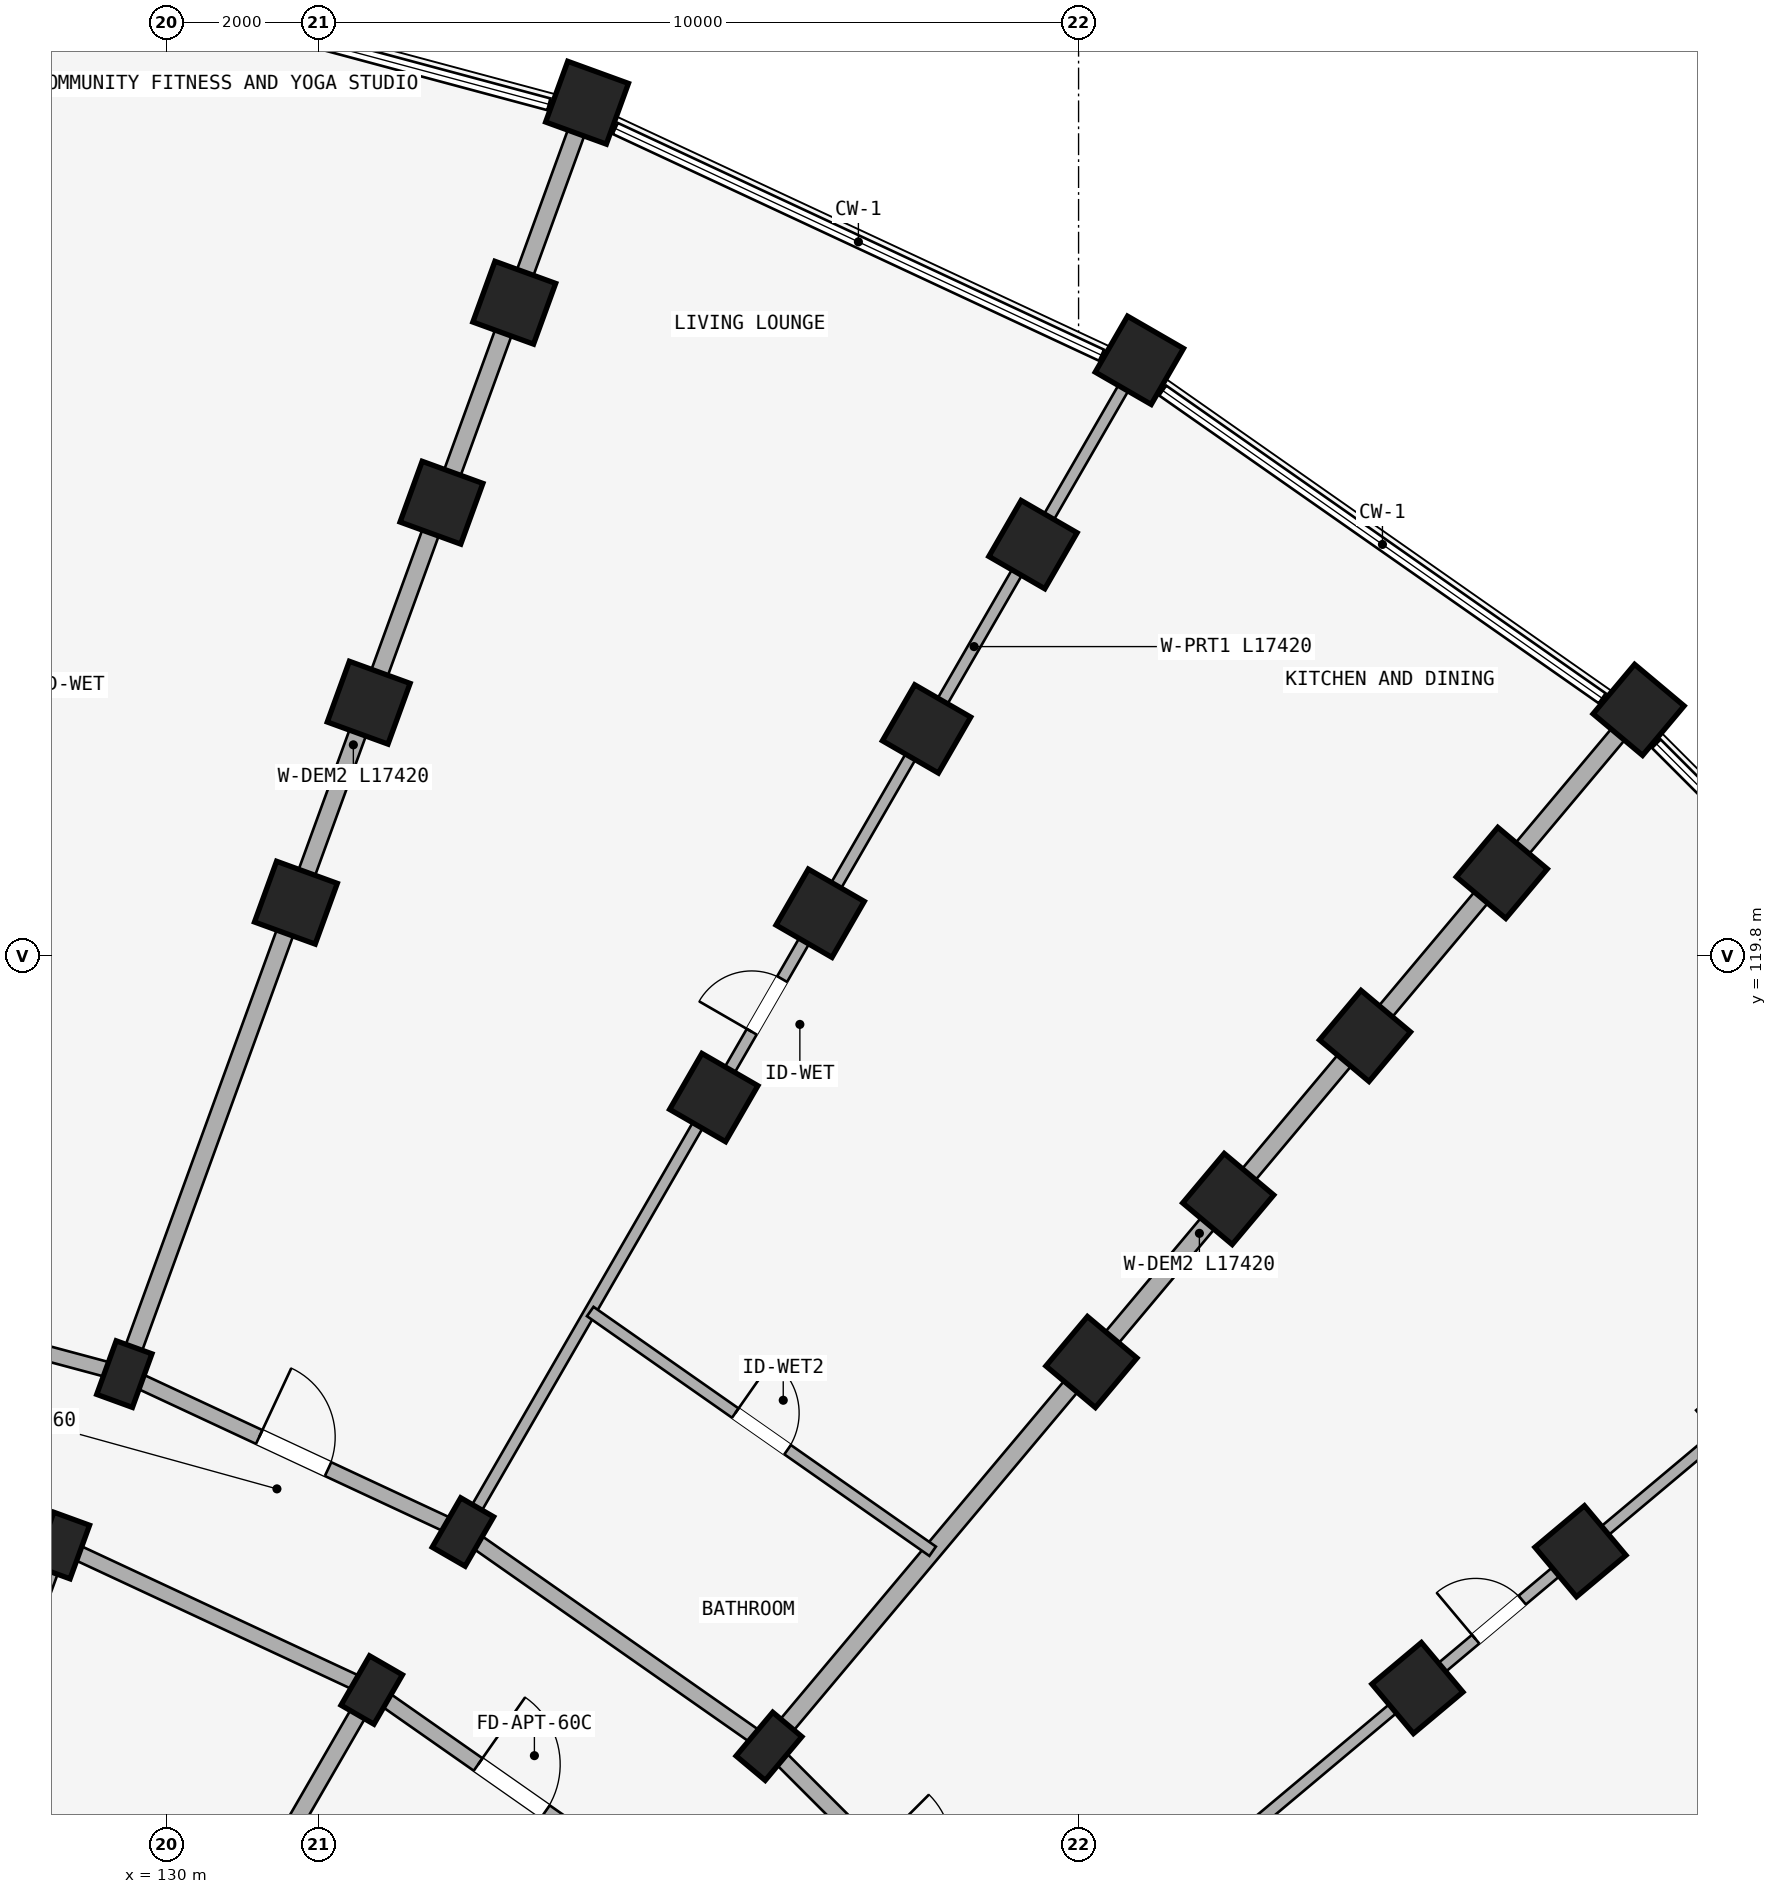
"""IFC4 building model, lengths in metres.
Left out: names, types, materials, properties, quantities, classifications, styles, units other than length and angle.
Written with IfcOpenShell. Run it as: python <this file> out.ifc"""

import sys

from ifc_helpers import new_model, si_unit, direction, frame, frame_2d, origin, origin_2d, place, context, subcontext, project, spatial, rectangle, extrude, element, fill, save


model = new_model("IFC4")
c1 = context("Model", 3, precision=1e-05, world=origin(), true_north=direction((0.0, 1.0)))
c2 = subcontext(c1, "Body", "Model", "MODEL_VIEW")
j1 = project(units=[si_unit("LENGTHUNIT", "METRE"), si_unit("PLANEANGLEUNIT", "RADIAN")], contexts=[c1])
p1 = place(None, origin())
s1 = spatial("IfcSite", under=j1, at=p1, CompositionType="ELEMENT")
p2 = place(p1, origin())
s2 = spatial("IfcBuilding", under=s1, at=p2, CompositionType="ELEMENT")
p3 = place(p2, frame((0.0, 0.0, 4.5)))
s3 = spatial("IfcBuildingStorey", under=s2, at=p3, CompositionType="ELEMENT", Elevation=4.5)
for number, where, z_axis, x_axis in (
    (1, (128.624, 112.044, 0.0), (0.0, 0.0, 1.0), (-0.94, 0.342, 0.0)),
    (2, (129.445, 114.299, 0.0), (0.0, 0.0, 1.0), (-0.94, 0.342, 0.0)),
):
    element("IfcColumn", number, at=place(p3, frame(where, z_axis=z_axis, x_axis=x_axis)), inside=s3, PredefinedType="COLUMN", context=c2, shape_type="SweptSolid", body=[
        extrude(rectangle(XDim=0.5, YDim=0.75, at=origin_2d()), origin(), (0.0, 0.0, 1.0), 3.98),
    ])
for number, where, z_axis, x_axis in (
    (3, (131.702, 120.501, 0.0), (0.0, 0.0, 1.0), (-0.94, 0.342, 0.0)),
    (4, (132.66, 123.132, 0.0), (0.0, 0.0, 1.0), (-0.94, 0.342, 0.0)),
    (5, (133.618, 125.764, 0.0), (0.0, 0.0, 1.0), (-0.94, 0.342, 0.0)),
    (6, (134.575, 128.395, 0.0), (0.0, 0.0, 1.0), (-0.94, 0.342, 0.0)),
    (7, (135.533, 131.026, 0.0), (0.0, 0.0, 1.0), (-0.94, 0.342, 0.0)),
):
    element("IfcColumn", number, at=place(p3, frame(where, z_axis=z_axis, x_axis=x_axis)), inside=s3, PredefinedType="COLUMN", context=c2, shape_type="SweptSolid", body=[
        extrude(rectangle(XDim=0.85, YDim=0.85, at=origin_2d()), origin(), (0.0, 0.0, 1.0), 3.98),
    ])
for number, where, z_axis, x_axis in (
    (8, (132.7, 110.144, 0.0), (0.0, 0.0, 1.0), (-0.866, 0.5, 0.0)),
    (9, (133.9, 112.222, 0.0), (0.0, 0.0, 1.0), (-0.866, 0.5, 0.0)),
):
    element("IfcColumn", number, at=place(p3, frame(where, z_axis=z_axis, x_axis=x_axis)), inside=s3, PredefinedType="COLUMN", context=c2, shape_type="SweptSolid", body=[
        extrude(rectangle(XDim=0.5, YDim=0.75, at=origin_2d()), origin(), (0.0, 0.0, 1.0), 3.98),
    ])
for number, where, z_axis, x_axis in (
    (10, (137.2, 117.938, 0.0), (0.0, 0.0, 1.0), (-0.866, 0.5, 0.0)),
    (11, (138.6, 120.363, 0.0), (0.0, 0.0, 1.0), (-0.866, 0.5, 0.0)),
    (12, (140.0, 122.787, 0.0), (0.0, 0.0, 1.0), (-0.866, 0.5, 0.0)),
    (13, (141.4, 125.212, 0.0), (0.0, 0.0, 1.0), (-0.866, 0.5, 0.0)),
    (14, (142.8, 127.637, 0.0), (0.0, 0.0, 1.0), (-0.866, 0.5, 0.0)),
):
    element("IfcColumn", number, at=place(p3, frame(where, z_axis=z_axis, x_axis=x_axis)), inside=s3, PredefinedType="COLUMN", context=c2, shape_type="SweptSolid", body=[
        extrude(rectangle(XDim=0.85, YDim=0.85, at=origin_2d()), origin(), (0.0, 0.0, 1.0), 3.98),
    ])
p4 = place(p3, frame((137.927, 109.402, 0.0), z_axis=(0.0, 0.0, 1.0), x_axis=(-0.766044443119, 0.642787609687, 0.0)))
e15 = element("IfcColumn", 15, at=p4, inside=s3, PredefinedType="COLUMN", context=c2, shape_type="SweptSolid", body=[
    extrude(rectangle(XDim=0.5, YDim=0.75, at=origin_2d()), origin(), (0.0, 0.0, 1.0), 3.98),
])
for number, where, z_axis, x_axis in (
    (16, (142.169, 114.458, 0.0), (0.0, 0.0, 1.0), (-0.766, 0.643, 0.0)),
    (17, (143.969, 116.603, 0.0), (0.0, 0.0, 1.0), (-0.766, 0.643, 0.0)),
    (18, (145.769, 118.748, 0.0), (0.0, 0.0, 1.0), (-0.766, 0.643, 0.0)),
    (19, (147.568, 120.893, 0.0), (0.0, 0.0, 1.0), (-0.766, 0.643, 0.0)),
    (20, (149.368, 123.038, 0.0), (0.0, 0.0, 1.0), (-0.766, 0.643, 0.0)),
    (21, (146.458, 110.169, 0.0), (0.0, 0.0, 1.0), (-0.643, 0.766, 0.0)),
    (22, (148.603, 111.969, 0.0), (0.0, 0.0, 1.0), (-0.643, 0.766, 0.0)),
):
    element("IfcColumn", number, at=place(p3, frame(where, z_axis=z_axis, x_axis=x_axis)), inside=s3, PredefinedType="COLUMN", context=c2, shape_type="SweptSolid", body=[
        extrude(rectangle(XDim=0.85, YDim=0.85, at=origin_2d()), origin(), (0.0, 0.0, 1.0), 3.98),
    ])
p5 = place(p3, frame((124.28, 113.208, 0.0), z_axis=(0.0, 0.0, 1.0), x_axis=(0.965934240054, -0.258787642463, 0.0)))
e23 = element("IfcWall", 23, at=p5, inside=s3, PredefinedType="STANDARD", context=c2, shape_type="SweptSolid", body=[
    extrude(rectangle(XDim=4.497, YDim=0.2, at=frame_2d((2.249, 0.0))), origin(), (0.0, 0.0, 1.0), 3.322),
])
p6 = place(p3, frame((124.697, 115.572, 0.0), z_axis=(0.0, 0.0, 1.0), x_axis=(0.965930095386, -0.258803112091, 0.0)))
e24 = element("IfcWall", 24, at=p6, inside=s3, PredefinedType="STANDARD", context=c2, shape_type="SweptSolid", body=[
    extrude(rectangle(XDim=4.916, YDim=0.2, at=frame_2d((2.458, 0.0))), origin(), (0.0, 0.0, 1.0), 3.322),
])
p7 = place(p3, frame((128.624, 112.044, 0.0), z_axis=(0.0, 0.0, 1.0), x_axis=(0.906307919131, -0.422617978463, 0.0)))
e25 = element("IfcWall", 25, at=p7, inside=s3, PredefinedType="STANDARD", context=c2, shape_type="SweptSolid", body=[
    extrude(rectangle(XDim=4.497, YDim=0.2, at=frame_2d((2.249, 0.0))), origin(), (0.0, 0.0, 1.0), 3.322),
])
p8 = place(p3, frame((129.445, 114.299, 0.0), z_axis=(0.0, 0.0, 1.0), x_axis=(0.906302381024, -0.422629854778, 0.0)))
e26 = element("IfcWall", 26, at=p8, inside=s3, PredefinedType="STANDARD", context=c2, shape_type="SweptSolid", body=[
    extrude(rectangle(XDim=4.915, YDim=0.2, at=frame_2d((2.458, 0.0))), origin(), (0.0, 0.0, 1.0), 3.322),
])
p9 = place(p8, frame((1.958, 0.0, 0.0)))
e27 = element("IfcOpeningElement", 27, at=p9, cuts=e26, PredefinedType="OPENING", context=c2, shape_type="SweptSolid", body=[
    extrude(rectangle(XDim=1.0, YDim=2.15, at=frame_2d((0.5, 1.075))), frame((0.0, 0.11, 0.0), z_axis=(0.0, -1.0, 0.0), x_axis=(1.0, 0.0, 0.0)), (0.0, 0.0, 1.0), 0.22),
])
p10 = place(p3, frame((132.7, 110.144, 0.0), z_axis=(0.0, 0.0, 1.0), x_axis=(0.819155404658, -0.573571637217, 0.0)))
e28 = element("IfcWall", 28, at=p10, inside=s3, PredefinedType="STANDARD", context=c2, shape_type="SweptSolid", body=[
    extrude(rectangle(XDim=4.497, YDim=0.2, at=frame_2d((2.249, 0.0))), origin(), (0.0, 0.0, 1.0), 3.322),
])
p11 = place(p10, frame((1.709, 0.0, 0.0)))
e29 = element("IfcOpeningElement", 29, at=p11, cuts=e28, PredefinedType="OPENING", context=c2, shape_type="SweptSolid", body=[
    extrude(rectangle(XDim=1.08, YDim=2.15, at=frame_2d((0.54, 1.075))), frame((0.0, 0.11, 0.0), z_axis=(0.0, -1.0, 0.0), x_axis=(1.0, 0.0, 0.0)), (0.0, 0.0, 1.0), 0.22),
])
p12 = place(p3, frame((133.9, 112.222, 0.0), z_axis=(0.0, 0.0, 1.0), x_axis=(0.819140911474, -0.573592335331, 0.0)))
e30 = element("IfcWall", 30, at=p12, inside=s3, PredefinedType="STANDARD", context=c2, shape_type="SweptSolid", body=[
    extrude(rectangle(XDim=4.916, YDim=0.2, at=frame_2d((2.458, 0.0))), origin(), (0.0, 0.0, 1.0), 3.322),
])
p13 = place(p3, frame((137.927, 109.402, 0.0), z_axis=(0.0, 0.0, 1.0), x_axis=(0.707106781187, -0.707106781187, 0.0)))
e31 = element("IfcWall", 31, at=p13, inside=s3, PredefinedType="STANDARD", context=c2, shape_type="SweptSolid", body=[
    extrude(rectangle(XDim=4.916, YDim=0.2, at=frame_2d((2.458, 0.0))), origin(), (0.0, 0.0, 1.0), 3.322),
])
p14 = place(p13, frame((1.938, 0.0, 0.0)))
e32 = element("IfcOpeningElement", 32, at=p14, cuts=e31, PredefinedType="OPENING", context=c2, shape_type="SweptSolid", body=[
    extrude(rectangle(XDim=1.04, YDim=2.15, at=frame_2d((0.52, 1.075))), frame((0.0, 0.11, 0.0), z_axis=(0.0, -1.0, 0.0), x_axis=(1.0, 0.0, 0.0)), (0.0, 0.0, 1.0), 0.22),
])
p15 = place(p3, frame((126.298, 105.654, 0.0), z_axis=(0.0, 0.0, 1.0), x_axis=(0.342010221662, 0.939696231917, 0.0)))
e33 = element("IfcWall", 33, at=p15, inside=s3, PredefinedType="PARTITIONING", context=c2, shape_type="SweptSolid", body=[
    extrude(rectangle(XDim=6.75, YDim=0.15, at=frame_2d((3.375, 0.0))), origin(), (0.0, 0.0, 1.0), 3.322),
])
p16 = place(p15, frame((3.242, 0.0, 0.0)))
e34 = element("IfcOpeningElement", 34, at=p16, cuts=e33, PredefinedType="OPENING", context=c2, shape_type="SweptSolid", body=[
    extrude(rectangle(XDim=0.94, YDim=2.1, at=frame_2d((0.47, 1.05))), frame((0.0, 0.085, 0.0), z_axis=(0.0, -1.0, 0.0), x_axis=(1.0, 0.0, 0.0)), (0.0, 0.0, 1.0), 0.17),
])
p17 = place(p3, frame((129.479, 114.393, 0.0), z_axis=(0.0, 0.0, 1.0), x_axis=(0.342022120477, 0.939691901159, 0.0)))
e35 = element("IfcWall", 35, at=p17, inside=s3, PredefinedType="STANDARD", context=c2, shape_type="SweptSolid", body=[
    extrude(rectangle(XDim=17.42, YDim=0.23, at=frame_2d((8.71, 0.0))), origin(), (0.0, 0.0, 1.0), 3.322),
])
p18 = place(p3, frame((129.3, 104.254, 0.0), z_axis=(0.0, 0.0, 1.0), x_axis=(0.499997969693, 0.866026575979, 0.0)))
e36 = element("IfcWall", 36, at=p18, inside=s3, PredefinedType="STANDARD", context=c2, shape_type="SweptSolid", body=[
    extrude(rectangle(XDim=6.75, YDim=0.22, at=frame_2d((3.375, 0.0))), origin(), (0.0, 0.0, 1.0), 3.322),
])
p19 = place(p3, frame((133.95, 112.309, 0.0), z_axis=(0.0, 0.0, 1.0), x_axis=(0.499997843263, 0.866026648973, 0.0)))
e37 = element("IfcWall", 37, at=p19, inside=s3, PredefinedType="PARTITIONING", context=c2, shape_type="SweptSolid", body=[
    extrude(rectangle(XDim=17.42, YDim=0.15, at=frame_2d((8.71, 0.0))), origin(), (0.0, 0.0, 1.0), 3.322),
])
p20 = place(p19, frame((7.5, 0.0, 0.0)))
e38 = element("IfcOpeningElement", 38, at=p20, cuts=e37, PredefinedType="OPENING", context=c2, shape_type="SweptSolid", body=[
    extrude(rectangle(XDim=0.8, YDim=2.1, at=frame_2d((0.4, 1.05))), frame((0.0, 0.085, 0.0), z_axis=(0.0, -1.0, 0.0), x_axis=(1.0, 0.0, 0.0)), (0.0, 0.0, 1.0), 0.17),
])
p21 = place(p3, frame((137.991, 109.479, 0.0), z_axis=(0.0, 0.0, 1.0), x_axis=(0.642784757967, 0.766046835987, 0.0)))
e39 = element("IfcWall", 39, at=p21, inside=s3, PredefinedType="STANDARD", context=c2, shape_type="SweptSolid", body=[
    extrude(rectangle(XDim=17.42, YDim=0.23, at=frame_2d((8.71, 0.0))), origin(), (0.0, 0.0, 1.0), 3.322),
])
p22 = place(p3, frame((141.479, 105.991, 0.0), z_axis=(0.0, 0.0, 1.0), x_axis=(0.766046835987, 0.642784757967, 0.0)))
e40 = element("IfcWall", 40, at=p22, inside=s3, PredefinedType="PARTITIONING", context=c2, shape_type="SweptSolid", body=[
    extrude(rectangle(XDim=17.42, YDim=0.15, at=frame_2d((8.71, 0.0))), origin(), (0.0, 0.0, 1.0), 3.322),
])
p23 = place(p22, frame((7.5, 0.0, 0.0)))
e41 = element("IfcOpeningElement", 41, at=p23, cuts=e40, PredefinedType="OPENING", context=c2, shape_type="SweptSolid", body=[
    extrude(rectangle(XDim=0.8, YDim=2.1, at=frame_2d((0.4, 1.05))), frame((0.0, 0.085, 0.0), z_axis=(0.0, -1.0, 0.0), x_axis=(1.0, 0.0, 0.0)), (0.0, 0.0, 1.0), 0.17),
])
p24 = place(p3, frame((144.309, 101.95, 0.0), z_axis=(0.0, 0.0, 1.0), x_axis=(0.866026648973, 0.499997843263, 0.0)))
e42 = element("IfcWall", 42, at=p24, inside=s3, PredefinedType="STANDARD", context=c2, shape_type="SweptSolid", body=[
    extrude(rectangle(XDim=17.42, YDim=0.23, at=frame_2d((8.71, 0.0))), origin(), (0.0, 0.0, 1.0), 3.322),
])
p25 = place(p3, frame((135.575, 115.123, 0.0), z_axis=(0.0, 0.0, 1.0), x_axis=(0.819156831143, -0.573569599955, 0.0)))
e43 = element("IfcWall", 43, at=p25, inside=s3, PredefinedType="PLUMBINGWALL", context=c2, shape_type="SweptSolid", body=[
    extrude(rectangle(XDim=5.5, YDim=0.15, at=frame_2d((2.75, 0.0))), origin(), (0.0, 0.0, 1.0), 3.322),
])
p26 = place(p25, frame((2.33, 0.0, 0.0)))
e44 = element("IfcOpeningElement", 44, at=p26, cuts=e43, PredefinedType="OPENING", context=c2, shape_type="SweptSolid", body=[
    extrude(rectangle(XDim=0.84, YDim=2.1, at=frame_2d((0.42, 1.05))), frame((0.0, 0.085, 0.0), z_axis=(0.0, -1.0, 0.0), x_axis=(1.0, 0.0, 0.0)), (0.0, 0.0, 1.0), 0.17),
])
p27 = place(p20, origin())
e45 = element("IfcDoor", 45, at=p27, inside=s3, OperationType="SINGLE_SWING_LEFT", PredefinedType="DOOR", context=c2, shape_type="SweptSolid", body=[
    extrude(rectangle(XDim=0.8, YDim=2.1, at=frame_2d((0.4, 1.05))), frame((0.0, 0.025, 0.0), z_axis=(0.0, -1.0, 0.0), x_axis=(1.0, 0.0, 0.0)), (0.0, 0.0, 1.0), 0.05),
])
fill(e38, e45)
p28 = place(p23, origin())
e46 = element("IfcDoor", 46, at=p28, inside=s3, OperationType="SINGLE_SWING_LEFT", PredefinedType="DOOR", context=c2, shape_type="SweptSolid", body=[
    extrude(rectangle(XDim=0.8, YDim=2.1, at=frame_2d((0.4, 1.05))), frame((0.0, 0.025, 0.0), z_axis=(0.0, -1.0, 0.0), x_axis=(1.0, 0.0, 0.0)), (0.0, 0.0, 1.0), 0.05),
])
fill(e41, e46)
p29 = place(p9, origin())
e47 = element("IfcDoor", 47, at=p29, inside=s3, OperationType="SINGLE_SWING_LEFT", PredefinedType="DOOR", context=c2, shape_type="SweptSolid", body=[
    extrude(rectangle(XDim=1.0, YDim=2.15, at=frame_2d((0.5, 1.075))), frame((0.0, 0.025, 0.0), z_axis=(0.0, -1.0, 0.0), x_axis=(1.0, 0.0, 0.0)), (0.0, 0.0, 1.0), 0.05),
])
fill(e27, e47)
p30 = place(p26, frame((0.84, 0.0, 0.0), z_axis=(0.0, 0.0, 1.0), x_axis=(-1.0, 0.0, 0.0)))
e48 = element("IfcDoor", 48, at=p30, inside=s3, OperationType="SINGLE_SWING_RIGHT", PredefinedType="DOOR", context=c2, shape_type="SweptSolid", body=[
    extrude(rectangle(XDim=0.84, YDim=2.1, at=frame_2d((0.42, 1.05))), frame((0.0, 0.025, 0.0), z_axis=(0.0, -1.0, 0.0), x_axis=(1.0, 0.0, 0.0)), (0.0, 0.0, 1.0), 0.05),
])
fill(e44, e48)
p31 = place(p11, frame((1.08, 0.0, 0.0), z_axis=(0.0, 0.0, 1.0), x_axis=(-1.0, 0.0, 0.0)))
e49 = element("IfcDoor", 49, at=p31, inside=s3, OperationType="SINGLE_SWING_RIGHT", PredefinedType="DOOR", context=c2, shape_type="SweptSolid", body=[
    extrude(rectangle(XDim=1.08, YDim=2.15, at=frame_2d((0.54, 1.075))), frame((0.0, 0.025, 0.0), z_axis=(0.0, -1.0, 0.0), x_axis=(1.0, 0.0, 0.0)), (0.0, 0.0, 1.0), 0.05),
])
fill(e29, e49)
save(model, sys.argv[1])
